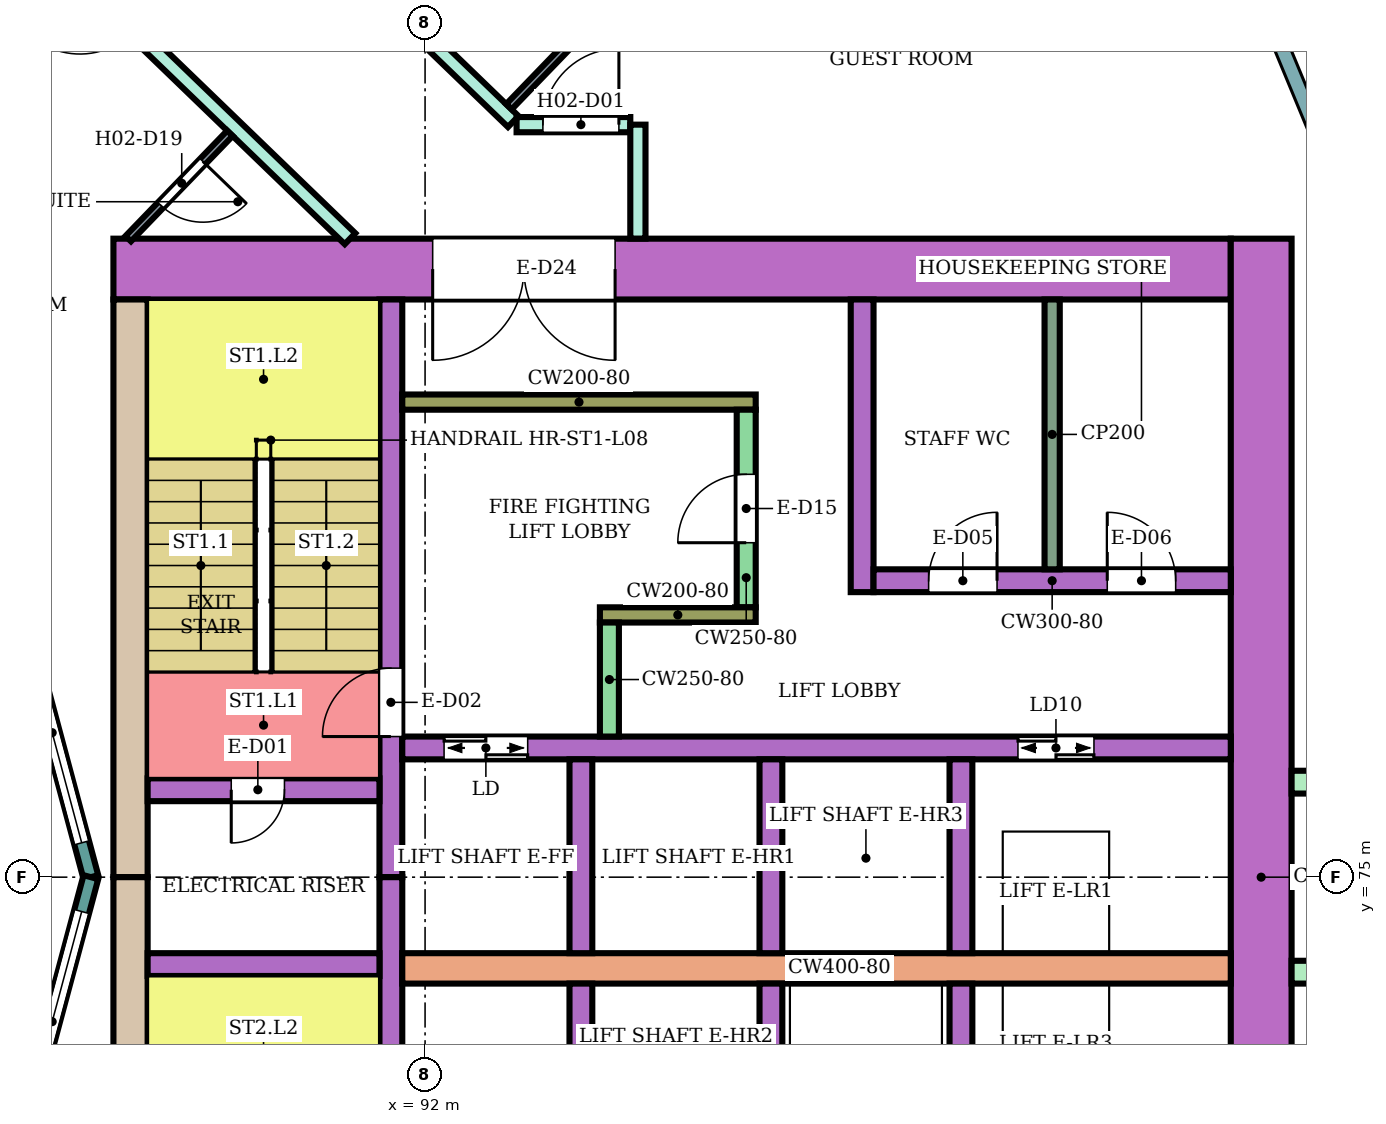
"""IFC4 building model, lengths in metres.
Left out: names, types, materials, properties, quantities, classifications, styles, units other than length and angle.
Written with IfcOpenShell. Run it as: python <this file> out.ifc"""

import sys

from ifc_helpers import new_model, si_unit, direction, frame, frame_2d, origin, place, context, subcontext, project, spatial, rectangle, extrude, element, fill, save


model = new_model("IFC4")
c1 = context("Model", 3, precision=1e-05, world=origin(), true_north=direction((0.0, 1.0)))
c2 = subcontext(c1, "Body", "Model", "MODEL_VIEW")
j1 = project(units=[si_unit("LENGTHUNIT", "METRE"), si_unit("PLANEANGLEUNIT", "RADIAN")], contexts=[c1])
p1 = place(None, origin())
s1 = spatial("IfcSite", under=j1, at=p1, CompositionType="ELEMENT")
p2 = place(p1, origin())
s2 = spatial("IfcBuilding", under=s1, at=p2, CompositionType="ELEMENT")
p3 = place(p2, frame((0.0, 0.0, 40.2)))
s3 = spatial("IfcBuildingStorey", under=s2, at=p3, CompositionType="ELEMENT", Elevation=40.2)
p4 = place(p3, frame((87.9, 83.0, 0.0), z_axis=(0.0, 0.0, 1.0), x_axis=(1.0, 0.0, 0.0)))
e1 = element("IfcWall", 1, at=p4, inside=s3, PredefinedType="SHEAR", context=c2, shape_type="SweptSolid", body=[
    extrude(rectangle(XDim=14.7, YDim=0.8, at=frame_2d((7.35, 0.0))), origin(), (0.0, 0.0, 1.0), 3.48),
])
p5 = place(p4, frame((4.2, 0.0, 0.0)))
e2 = element("IfcOpeningElement", 2, at=p5, cuts=e1, PredefinedType="OPENING", context=c2, shape_type="SweptSolid", body=[
    extrude(rectangle(XDim=2.4, YDim=2.4, at=frame_2d((1.2, 1.2))), frame((0.0, 0.41, 0.0), z_axis=(0.0, -1.0, 0.0), x_axis=(1.0, 0.0, 0.0)), (0.0, 0.0, 1.0), 0.82),
])
for number, where, z_axis, x_axis in (
    (3, (88.125, 75.0, 0.0), (0.0, 0.0, 1.0), (0.0, 1.0, 0.0)),
    (4, (88.125, 67.4, 0.0), (0.0, 0.0, 1.0), (0.0, 1.0, 0.0)),
):
    element("IfcWall", number, at=place(p3, frame(where, z_axis=z_axis, x_axis=x_axis)), inside=s3, PredefinedType="SHEAR", context=c2, shape_type="SweptSolid", body=[
        extrude(rectangle(XDim=7.6, YDim=0.45, at=frame_2d((3.8, 0.0))), origin(), (0.0, 0.0, 1.0), 3.48),
    ])
p6 = place(p3, frame((103.0, 66.6, 0.0), z_axis=(0.0, 0.0, 1.0), x_axis=(0.0, 1.0, 0.0)))
e5 = element("IfcWall", 5, at=p6, inside=s3, PredefinedType="SHEAR", context=c2, shape_type="SweptSolid", body=[
    extrude(rectangle(XDim=16.8, YDim=0.8, at=frame_2d((8.4, 0.0))), origin(), (0.0, 0.0, 1.0), 3.48),
])
p7 = place(p3, frame((91.55, 75.0, 0.0), z_axis=(0.0, 0.0, 1.0), x_axis=(0.0, 1.0, 0.0)))
e6 = element("IfcWall", 6, at=p7, inside=s3, PredefinedType="SHEAR", context=c2, shape_type="SweptSolid", body=[
    extrude(rectangle(XDim=7.6, YDim=0.3, at=frame_2d((3.8, 0.0))), origin(), (0.0, 0.0, 1.0), 3.48),
])
p8 = place(p7, frame((1.85, 0.0, 0.0)))
e7 = element("IfcOpeningElement", 7, at=p8, cuts=e6, PredefinedType="OPENING", context=c2, shape_type="SweptSolid", body=[
    extrude(rectangle(XDim=0.9, YDim=2.1, at=frame_2d((0.45, 1.05))), frame((0.0, 0.16, 0.0), z_axis=(0.0, -1.0, 0.0), x_axis=(1.0, 0.0, 0.0)), (0.0, 0.0, 1.0), 0.32),
])
p9 = place(p3, frame((91.55, 67.4, 0.0), z_axis=(0.0, 0.0, 1.0), x_axis=(0.0, 1.0, 0.0)))
e8 = element("IfcWall", 8, at=p9, inside=s3, PredefinedType="SHEAR", context=c2, shape_type="SweptSolid", body=[
    extrude(rectangle(XDim=7.6, YDim=0.3, at=frame_2d((3.8, 0.0))), origin(), (0.0, 0.0, 1.0), 3.48),
])
p10 = place(p9, frame((0.25, 0.0, 0.0)))
e9 = element("IfcOpeningElement", 9, at=p10, cuts=e8, PredefinedType="OPENING", context=c2, shape_type="SweptSolid", body=[
    extrude(rectangle(XDim=0.9, YDim=2.1, at=frame_2d((0.45, 1.05))), frame((0.0, 0.16, 0.0), z_axis=(0.0, -1.0, 0.0), x_axis=(1.0, 0.0, 0.0)), (0.0, 0.0, 1.0), 0.32),
])
p11 = place(p3, frame((88.35, 76.15, 0.0), z_axis=(0.0, 0.0, 1.0), x_axis=(1.0, 0.0, 0.0)))
e10 = element("IfcWall", 10, at=p11, inside=s3, PredefinedType="SHEAR", context=c2, shape_type="SweptSolid", body=[
    extrude(rectangle(XDim=3.05, YDim=0.3, at=frame_2d((1.525, 0.0))), origin(), (0.0, 0.0, 1.0), 3.48),
])
p12 = place(p11, frame((1.1, 0.0, 0.0)))
e11 = element("IfcOpeningElement", 11, at=p12, cuts=e10, PredefinedType="OPENING", context=c2, shape_type="SweptSolid", body=[
    extrude(rectangle(XDim=0.7, YDim=2.0, at=frame_2d((0.35, 1.0))), frame((0.0, 0.16, 0.0), z_axis=(0.0, -1.0, 0.0), x_axis=(1.0, 0.0, 0.0)), (0.0, 0.0, 1.0), 0.32),
])
p13 = place(p3, frame((88.35, 73.85, 0.0), z_axis=(0.0, 0.0, 1.0), x_axis=(1.0, 0.0, 0.0)))
e12 = element("IfcWall", 12, at=p13, inside=s3, PredefinedType="SHEAR", context=c2, shape_type="SweptSolid", body=[
    extrude(rectangle(XDim=3.05, YDim=0.3, at=frame_2d((1.525, 0.0))), origin(), (0.0, 0.0, 1.0), 3.48),
])
p14 = place(p3, frame((91.7, 76.7, 0.0), z_axis=(0.0, 0.0, 1.0), x_axis=(1.0, 0.0, 0.0)))
e13 = element("IfcWall", 13, at=p14, inside=s3, PredefinedType="SHEAR", context=c2, shape_type="SweptSolid", body=[
    extrude(rectangle(XDim=10.9, YDim=0.3, at=frame_2d((5.45, 0.0))), origin(), (0.0, 0.0, 1.0), 3.48),
])
p15 = place(p14, frame((0.55, 0.0, 0.0)))
e14 = element("IfcOpeningElement", 14, at=p15, cuts=e13, PredefinedType="OPENING", context=c2, shape_type="SweptSolid", body=[
    extrude(rectangle(XDim=1.1, YDim=2.1, at=frame_2d((0.55, 1.05))), frame((0.0, 0.16, 0.0), z_axis=(0.0, -1.0, 0.0), x_axis=(1.0, 0.0, 0.0)), (0.0, 0.0, 1.0), 0.32),
])
p16 = place(p14, frame((8.1, 0.0, 0.0)))
e15 = element("IfcOpeningElement", 15, at=p16, cuts=e13, PredefinedType="OPENING", context=c2, shape_type="SweptSolid", body=[
    extrude(rectangle(XDim=1.0, YDim=2.1, at=frame_2d((0.5, 1.05))), frame((0.0, 0.16, 0.0), z_axis=(0.0, -1.0, 0.0), x_axis=(1.0, 0.0, 0.0)), (0.0, 0.0, 1.0), 0.32),
])
p17 = place(p3, frame((91.7, 73.8, 0.0), z_axis=(0.0, 0.0, 1.0), x_axis=(1.0, 0.0, 0.0)))
e16 = element("IfcWall", 16, at=p17, inside=s3, PredefinedType="SHEAR", context=c2, shape_type="SweptSolid", body=[
    extrude(rectangle(XDim=10.9, YDim=0.4, at=frame_2d((5.45, 0.0))), origin(), (0.0, 0.0, 1.0), 3.48),
])
for number, where, z_axis, x_axis in (
    (17, (94.05, 74.0, 0.0), (0.0, 0.0, 1.0), (0.0, 1.0, 0.0)),
    (18, (96.55, 74.0, 0.0), (0.0, 0.0, 1.0), (0.0, 1.0, 0.0)),
    (19, (99.05, 74.0, 0.0), (0.0, 0.0, 1.0), (0.0, 1.0, 0.0)),
    (20, (94.05, 71.05, 0.0), (0.0, 0.0, 1.0), (0.0, 1.0, 0.0)),
    (21, (96.55, 71.05, 0.0), (0.0, 0.0, 1.0), (0.0, 1.0, 0.0)),
    (22, (99.05, 71.05, 0.0), (0.0, 0.0, 1.0), (0.0, 1.0, 0.0)),
):
    element("IfcWall", number, at=place(p3, frame(where, z_axis=z_axis, x_axis=x_axis)), inside=s3, PredefinedType="SHEAR", context=c2, shape_type="SweptSolid", body=[
        extrude(rectangle(XDim=2.55, YDim=0.3, at=frame_2d((1.275, 0.0))), origin(), (0.0, 0.0, 1.0), 3.48),
    ])
p18 = place(p3, frame((91.7, 81.25, 0.0), z_axis=(0.0, 0.0, 1.0), x_axis=(1.0, 0.0, 0.0)))
e23 = element("IfcWall", 23, at=p18, inside=s3, PredefinedType="SHEAR", context=c2, shape_type="SweptSolid", body=[
    extrude(rectangle(XDim=4.65, YDim=0.2, at=frame_2d((2.325, 0.0))), origin(), (0.0, 0.0, 1.0), 3.48),
])
p19 = place(p3, frame((96.225, 78.55, 0.0), z_axis=(0.0, 0.0, 1.0), x_axis=(0.0, 1.0, 0.0)))
e24 = element("IfcWall", 24, at=p19, inside=s3, PredefinedType="SHEAR", context=c2, shape_type="SweptSolid", body=[
    extrude(rectangle(XDim=2.6, YDim=0.25, at=frame_2d((1.3, 0.0))), origin(), (0.0, 0.0, 1.0), 3.48),
])
p20 = place(p19, frame((0.85, 0.0, 0.0)))
e25 = element("IfcOpeningElement", 25, at=p20, cuts=e24, PredefinedType="OPENING", context=c2, shape_type="SweptSolid", body=[
    extrude(rectangle(XDim=0.9, YDim=2.1, at=frame_2d((0.45, 1.05))), frame((0.0, 0.135, 0.0), z_axis=(0.0, -1.0, 0.0), x_axis=(1.0, 0.0, 0.0)), (0.0, 0.0, 1.0), 0.27),
])
p21 = place(p3, frame((94.3, 78.45, 0.0), z_axis=(0.0, 0.0, 1.0), x_axis=(1.0, 0.0, 0.0)))
e26 = element("IfcWall", 26, at=p21, inside=s3, PredefinedType="SHEAR", context=c2, shape_type="SweptSolid", body=[
    extrude(rectangle(XDim=2.05, YDim=0.2, at=frame_2d((1.025, 0.0))), origin(), (0.0, 0.0, 1.0), 3.48),
])
p22 = place(p3, frame((94.425, 76.85, 0.0), z_axis=(0.0, 0.0, 1.0), x_axis=(0.0, 1.0, 0.0)))
e27 = element("IfcWall", 27, at=p22, inside=s3, PredefinedType="SHEAR", context=c2, shape_type="SweptSolid", body=[
    extrude(rectangle(XDim=1.5, YDim=0.25, at=frame_2d((0.75, 0.0))), origin(), (0.0, 0.0, 1.0), 3.48),
])
p23 = place(p3, frame((97.75, 78.75, 0.0), z_axis=(0.0, 0.0, 1.0), x_axis=(0.0, 1.0, 0.0)))
e28 = element("IfcWall", 28, at=p23, inside=s3, PredefinedType="SHEAR", context=c2, shape_type="SweptSolid", body=[
    extrude(rectangle(XDim=3.85, YDim=0.3, at=frame_2d((1.925, 0.0))), origin(), (0.0, 0.0, 1.0), 3.48),
])
p24 = place(p3, frame((97.9, 78.9, 0.0), z_axis=(0.0, 0.0, 1.0), x_axis=(1.0, 0.0, 0.0)))
e29 = element("IfcWall", 29, at=p24, inside=s3, PredefinedType="SHEAR", context=c2, shape_type="SweptSolid", body=[
    extrude(rectangle(XDim=4.7, YDim=0.3, at=frame_2d((2.35, 0.0))), origin(), (0.0, 0.0, 1.0), 3.48),
])
p25 = place(p24, frame((0.725, 0.0, 0.0)))
e30 = element("IfcOpeningElement", 30, at=p25, cuts=e29, PredefinedType="OPENING", context=c2, shape_type="SweptSolid", body=[
    extrude(rectangle(XDim=0.9, YDim=2.1, at=frame_2d((0.45, 1.05))), frame((0.0, 0.16, 0.0), z_axis=(0.0, -1.0, 0.0), x_axis=(1.0, 0.0, 0.0)), (0.0, 0.0, 1.0), 0.32),
])
p26 = place(p24, frame((3.075, 0.0, 0.0)))
e31 = element("IfcOpeningElement", 31, at=p26, cuts=e29, PredefinedType="OPENING", context=c2, shape_type="SweptSolid", body=[
    extrude(rectangle(XDim=0.9, YDim=2.1, at=frame_2d((0.45, 1.05))), frame((0.0, 0.16, 0.0), z_axis=(0.0, -1.0, 0.0), x_axis=(1.0, 0.0, 0.0)), (0.0, 0.0, 1.0), 0.32),
])
for number, where, z_axis, x_axis in (
    (32, (103.4, 73.75, 0.0), (0.0, 0.0, 1.0), (1.0, 0.0, 0.0)),
    (33, (103.4, 76.25, 0.0), (0.0, 0.0, 1.0), (1.0, 0.0, 0.0)),
):
    element("IfcWall", number, at=place(p3, frame(where, z_axis=z_axis, x_axis=x_axis)), inside=s3, PredefinedType="NOTDEFINED", context=c2, shape_type="SweptSolid", body=[
        extrude(rectangle(XDim=2.416, YDim=0.3, at=frame_2d((1.208, 0.0))), origin(), (0.0, 0.0, 1.0), 3.8),
    ])
p27 = place(p3, frame((87.604, 75.0, 0.0), z_axis=(0.0, 0.0, 1.0), x_axis=(-0.258789828301, 0.965933654434, 0.0)))
e34 = element("IfcWall", 34, at=p27, inside=s3, PredefinedType="NOTDEFINED", context=c2, shape_type="SweptSolid", body=[
    extrude(rectangle(XDim=3.936, YDim=0.2, at=frame_2d((1.968, 0.0))), origin(), (0.0, 0.0, 1.0), 3.8),
])
p28 = place(p27, frame((0.468, 0.0, 0.9)))
e35 = element("IfcOpeningElement", 35, at=p28, cuts=e34, PredefinedType="OPENING", context=c2, shape_type="SweptSolid", body=[
    extrude(rectangle(XDim=3.0, YDim=2.3, at=frame_2d((1.5, 1.15))), frame((0.0, 0.11, 0.0), z_axis=(0.0, -1.0, 0.0), x_axis=(1.0, 0.0, 0.0)), (0.0, 0.0, 1.0), 0.22),
])
p29 = place(p3, frame((86.585, 71.198, 0.0), z_axis=(0.0, 0.0, 1.0), x_axis=(0.258789828301, 0.965933654434, 0.0)))
e36 = element("IfcWall", 36, at=p29, inside=s3, PredefinedType="NOTDEFINED", context=c2, shape_type="SweptSolid", body=[
    extrude(rectangle(XDim=3.936, YDim=0.2, at=frame_2d((1.968, 0.0))), origin(), (0.0, 0.0, 1.0), 3.8),
])
p30 = place(p29, frame((0.468, 0.0, 0.9)))
e37 = element("IfcOpeningElement", 37, at=p30, cuts=e36, PredefinedType="OPENING", context=c2, shape_type="SweptSolid", body=[
    extrude(rectangle(XDim=3.0, YDim=2.3, at=frame_2d((1.5, 1.15))), frame((0.0, 0.11, 0.0), z_axis=(0.0, -1.0, 0.0), x_axis=(1.0, 0.0, 0.0)), (0.0, 0.0, 1.0), 0.22),
])
p31 = place(p3, frame((87.064, 87.211, 0.0), z_axis=(0.0, 0.0, 1.0), x_axis=(0.719540958932, -0.694450004262, 0.0)))
e38 = element("IfcWall", 38, at=p31, inside=s3, PredefinedType="PARTITIONING", context=c2, shape_type="SweptSolid", body=[
    extrude(rectangle(XDim=5.488, YDim=0.2, at=frame_2d((2.744, 0.0))), origin(), (0.0, 0.0, 1.0), 3.35),
])
p32 = place(p31, frame((0.55, 0.0, 0.0)))
e39 = element("IfcOpeningElement", 39, at=p32, cuts=e38, PredefinedType="OPENING", context=c2, shape_type="SweptSolid", body=[
    extrude(rectangle(XDim=1.0, YDim=2.1, at=frame_2d((0.5, 1.05))), frame((0.0, 0.11, 0.0), z_axis=(0.0, -1.0, 0.0), x_axis=(1.0, 0.0, 0.0)), (0.0, 0.0, 1.0), 0.22),
])
p33 = place(p3, frame((88.465, 89.473, 0.0), z_axis=(0.0, 0.0, 1.0), x_axis=(0.719474304909, -0.694519059908, 0.0)))
e40 = element("IfcWall", 40, at=p33, inside=s3, PredefinedType="PARTITIONING", context=c2, shape_type="SweptSolid", body=[
    extrude(rectangle(XDim=6.525, YDim=0.2, at=frame_2d((3.263, 0.0))), origin(), (0.0, 0.0, 1.0), 3.35),
])
p34 = place(p33, frame((2.719, 0.0, 0.0)))
e41 = element("IfcOpeningElement", 41, at=p34, cuts=e40, PredefinedType="OPENING", context=c2, shape_type="SweptSolid", body=[
    extrude(rectangle(XDim=1.0, YDim=2.1, at=frame_2d((0.5, 1.05))), frame((0.0, 0.11, 0.0), z_axis=(0.0, -1.0, 0.0), x_axis=(1.0, 0.0, 0.0)), (0.0, 0.0, 1.0), 0.22),
])
p35 = place(p3, frame((93.204, 84.9, 0.0), z_axis=(0.0, 0.0, 1.0), x_axis=(1.0, 0.0, 0.0)))
e42 = element("IfcWall", 42, at=p35, inside=s3, PredefinedType="PARTITIONING", context=c2, shape_type="SweptSolid", body=[
    extrude(rectangle(XDim=1.496, YDim=0.2, at=frame_2d((0.748, 0.0))), origin(), (0.0, 0.0, 1.0), 3.35),
])
p36 = place(p35, frame((0.346, 0.0, 0.0)))
e43 = element("IfcOpeningElement", 43, at=p36, cuts=e42, PredefinedType="OPENING", context=c2, shape_type="SweptSolid", body=[
    extrude(rectangle(XDim=1.0, YDim=2.1, at=frame_2d((0.5, 1.05))), frame((0.0, 0.11, 0.0), z_axis=(0.0, -1.0, 0.0), x_axis=(1.0, 0.0, 0.0)), (0.0, 0.0, 1.0), 0.22),
])
p37 = place(p3, frame((94.8, 83.401, 0.0), z_axis=(0.0, 0.0, 1.0), x_axis=(0.0, 1.0, 0.0)))
e44 = element("IfcWall", 44, at=p37, inside=s3, PredefinedType="PARTITIONING", context=c2, shape_type="SweptSolid", body=[
    extrude(rectangle(XDim=1.499, YDim=0.2, at=frame_2d((0.75, 0.0))), origin(), (0.0, 0.0, 1.0), 3.35),
])
p38 = place(p3, frame((88.095, 83.4, 0.0), z_axis=(0.0, 0.0, 1.0), x_axis=(0.694447472534, 0.719543402368, 0.0)))
e45 = element("IfcWall", 45, at=p38, inside=s3, PredefinedType="PARTITIONING", context=c2, shape_type="SweptSolid", body=[
    extrude(rectangle(XDim=1.926, YDim=0.1, at=frame_2d((0.963, 0.0))), origin(), (0.0, 0.0, 1.0), 3.35),
])
p39 = place(p38, frame((0.613, 0.0, 0.0)))
e46 = element("IfcOpeningElement", 46, at=p39, cuts=e45, PredefinedType="OPENING", context=c2, shape_type="SweptSolid", body=[
    extrude(rectangle(XDim=0.8, YDim=2.1, at=frame_2d((0.4, 1.05))), frame((0.0, 0.06, 0.0), z_axis=(0.0, -1.0, 0.0), x_axis=(1.0, 0.0, 0.0)), (0.0, 0.0, 1.0), 0.12),
])
p40 = place(p3, frame((93.104, 85.136, 0.0), z_axis=(0.0, 0.0, 1.0), x_axis=(0.694324808789, 0.719661767708, 0.0)))
e47 = element("IfcWall", 47, at=p40, inside=s3, PredefinedType="PARTITIONING", context=c2, shape_type="SweptSolid", body=[
    extrude(rectangle(XDim=2.65, YDim=0.1, at=frame_2d((1.325, 0.0))), origin(), (0.0, 0.0, 1.0), 3.35),
])
p41 = place(p40, frame((1.05, 0.0, 0.0)))
e48 = element("IfcOpeningElement", 48, at=p41, cuts=e47, PredefinedType="OPENING", context=c2, shape_type="SweptSolid", body=[
    extrude(rectangle(XDim=0.8, YDim=2.1, at=frame_2d((0.4, 1.05))), frame((0.0, 0.06, 0.0), z_axis=(0.0, -1.0, 0.0), x_axis=(1.0, 0.0, 0.0)), (0.0, 0.0, 1.0), 0.12),
])
p42 = place(p3, frame((100.25, 79.05, 0.0), z_axis=(0.0, 0.0, 1.0), x_axis=(0.0, 1.0, 0.0)))
e49 = element("IfcWall", 49, at=p42, inside=s3, PredefinedType="PARTITIONING", context=c2, shape_type="SweptSolid", body=[
    extrude(rectangle(XDim=3.55, YDim=0.2, at=frame_2d((1.775, 0.0))), origin(), (0.0, 0.0, 1.0), 3.48),
])
p43 = place(p28, origin())
e50 = element("IfcWindow", 50, at=p43, inside=s3, PartitioningType="SINGLE_PANEL", PredefinedType="WINDOW", context=c2, shape_type="SweptSolid", body=[
    extrude(rectangle(XDim=3.0, YDim=2.3, at=frame_2d((1.5, 1.15))), frame((0.0, 0.03, 0.0), z_axis=(0.0, -1.0, 0.0), x_axis=(1.0, 0.0, 0.0)), (0.0, 0.0, 1.0), 0.06),
])
fill(e35, e50)
p44 = place(p30, origin())
e51 = element("IfcWindow", 51, at=p44, inside=s3, PartitioningType="SINGLE_PANEL", PredefinedType="WINDOW", context=c2, shape_type="SweptSolid", body=[
    extrude(rectangle(XDim=3.0, YDim=2.3, at=frame_2d((1.5, 1.15))), frame((0.0, 0.03, 0.0), z_axis=(0.0, -1.0, 0.0), x_axis=(1.0, 0.0, 0.0)), (0.0, 0.0, 1.0), 0.06),
])
fill(e37, e51)
p45 = place(p36, origin())
e52 = element("IfcDoor", 52, at=p45, inside=s3, OperationType="SINGLE_SWING_RIGHT", PredefinedType="DOOR", context=c2, shape_type="SweptSolid", body=[
    extrude(rectangle(XDim=1.0, YDim=2.1, at=frame_2d((0.5, 1.05))), frame((0.0, 0.025, 0.0), z_axis=(0.0, -1.0, 0.0), x_axis=(1.0, 0.0, 0.0)), (0.0, 0.0, 1.0), 0.05),
])
fill(e43, e52)
p46 = place(p39, frame((0.8, 0.0, 0.0), z_axis=(0.0, 0.0, 1.0), x_axis=(-1.0, 0.0, 0.0)))
e53 = element("IfcDoor", 53, at=p46, inside=s3, OperationType="SINGLE_SWING_LEFT", PredefinedType="DOOR", context=c2, shape_type="SweptSolid", body=[
    extrude(rectangle(XDim=0.8, YDim=2.1, at=frame_2d((0.4, 1.05))), frame((0.0, 0.025, 0.0), z_axis=(0.0, -1.0, 0.0), x_axis=(1.0, 0.0, 0.0)), (0.0, 0.0, 1.0), 0.05),
])
fill(e46, e53)
p47 = place(p12, frame((0.7, 0.0, 0.0), z_axis=(0.0, 0.0, 1.0), x_axis=(-1.0, 0.0, 0.0)))
e54 = element("IfcDoor", 54, at=p47, inside=s3, OperationType="SINGLE_SWING_RIGHT", PredefinedType="DOOR", context=c2, shape_type="SweptSolid", body=[
    extrude(rectangle(XDim=0.7, YDim=2.0, at=frame_2d((0.35, 1.0))), frame((0.0, 0.025, 0.0), z_axis=(0.0, -1.0, 0.0), x_axis=(1.0, 0.0, 0.0)), (0.0, 0.0, 1.0), 0.05),
])
fill(e11, e54)
p48 = place(p8, origin())
e55 = element("IfcDoor", 55, at=p48, inside=s3, OperationType="SINGLE_SWING_LEFT", PredefinedType="DOOR", context=c2, shape_type="SweptSolid", body=[
    extrude(rectangle(XDim=0.9, YDim=2.1, at=frame_2d((0.45, 1.05))), frame((0.0, 0.025, 0.0), z_axis=(0.0, -1.0, 0.0), x_axis=(1.0, 0.0, 0.0)), (0.0, 0.0, 1.0), 0.05),
])
fill(e7, e55)
p49 = place(p15, origin())
e56 = element("IfcDoor", 56, at=p49, inside=s3, OperationType="DOUBLE_DOOR_SLIDING", PredefinedType="DOOR", context=c2, shape_type="SweptSolid", body=[
    extrude(rectangle(XDim=1.1, YDim=2.1, at=frame_2d((0.55, 1.05))), frame((0.0, 0.025, 0.0), z_axis=(0.0, -1.0, 0.0), x_axis=(1.0, 0.0, 0.0)), (0.0, 0.0, 1.0), 0.05),
])
fill(e14, e56)
p50 = place(p16, origin())
e57 = element("IfcDoor", 57, at=p50, inside=s3, OperationType="DOUBLE_DOOR_SLIDING", PredefinedType="DOOR", context=c2, shape_type="SweptSolid", body=[
    extrude(rectangle(XDim=1.0, YDim=2.1, at=frame_2d((0.5, 1.05))), frame((0.0, 0.025, 0.0), z_axis=(0.0, -1.0, 0.0), x_axis=(1.0, 0.0, 0.0)), (0.0, 0.0, 1.0), 0.05),
])
fill(e15, e57)
p51 = place(p20, origin())
e58 = element("IfcDoor", 58, at=p51, inside=s3, OperationType="SINGLE_SWING_LEFT", PredefinedType="DOOR", context=c2, shape_type="SweptSolid", body=[
    extrude(rectangle(XDim=0.9, YDim=2.1, at=frame_2d((0.45, 1.05))), frame((0.0, 0.025, 0.0), z_axis=(0.0, -1.0, 0.0), x_axis=(1.0, 0.0, 0.0)), (0.0, 0.0, 1.0), 0.05),
])
fill(e25, e58)
p52 = place(p25, origin())
e59 = element("IfcDoor", 59, at=p52, inside=s3, OperationType="SINGLE_SWING_RIGHT", PredefinedType="DOOR", context=c2, shape_type="SweptSolid", body=[
    extrude(rectangle(XDim=0.9, YDim=2.1, at=frame_2d((0.45, 1.05))), frame((0.0, 0.025, 0.0), z_axis=(0.0, -1.0, 0.0), x_axis=(1.0, 0.0, 0.0)), (0.0, 0.0, 1.0), 0.05),
])
fill(e30, e59)
p53 = place(p26, origin())
e60 = element("IfcDoor", 60, at=p53, inside=s3, OperationType="SINGLE_SWING_LEFT", PredefinedType="DOOR", context=c2, shape_type="SweptSolid", body=[
    extrude(rectangle(XDim=0.9, YDim=2.1, at=frame_2d((0.45, 1.05))), frame((0.0, 0.025, 0.0), z_axis=(0.0, -1.0, 0.0), x_axis=(1.0, 0.0, 0.0)), (0.0, 0.0, 1.0), 0.05),
])
fill(e31, e60)
p54 = place(p5, frame((2.4, 0.0, 0.0), z_axis=(0.0, 0.0, 1.0), x_axis=(-1.0, 0.0, 0.0)))
e61 = element("IfcDoor", 61, at=p54, inside=s3, OperationType="DOUBLE_DOOR_SINGLE_SWING", PredefinedType="DOOR", context=c2, shape_type="SweptSolid", body=[
    extrude(rectangle(XDim=2.4, YDim=2.4, at=frame_2d((1.2, 1.2))), frame((0.0, 0.025, 0.0), z_axis=(0.0, -1.0, 0.0), x_axis=(1.0, 0.0, 0.0)), (0.0, 0.0, 1.0), 0.05),
])
fill(e2, e61)
save(model, sys.argv[1])
